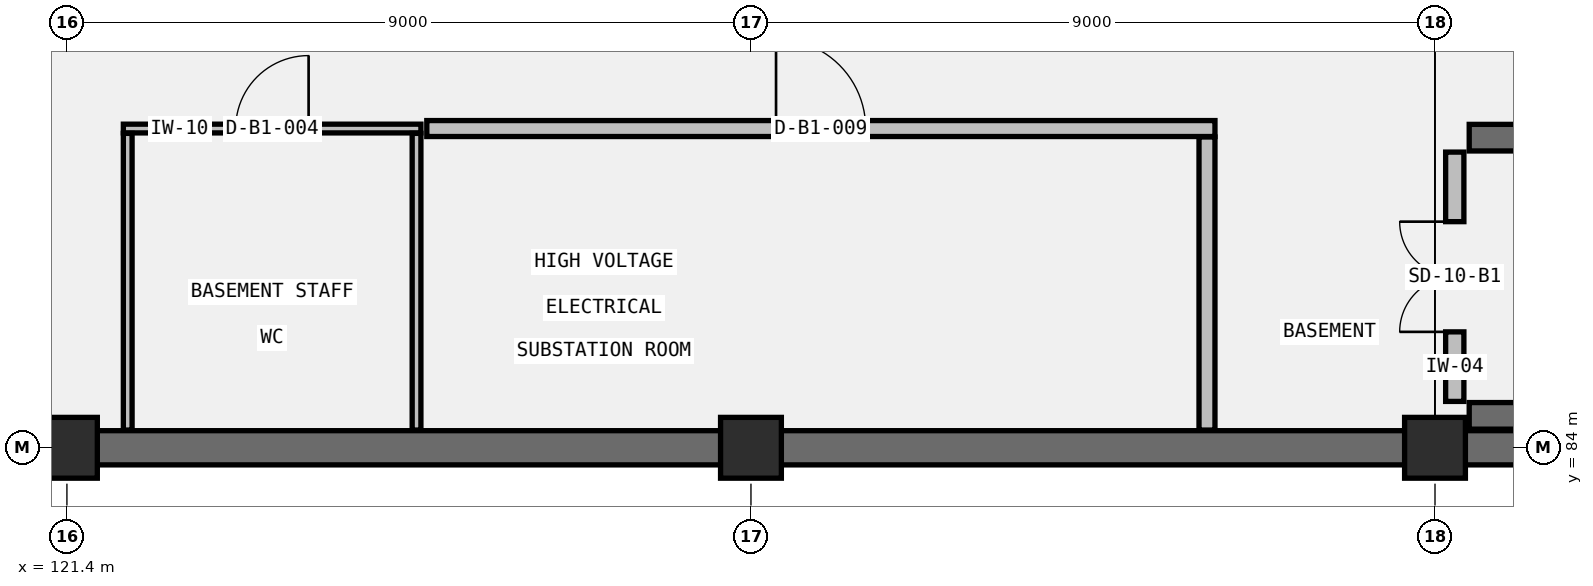
"""IFC4 building model, lengths in metres.
Left out: names, types, materials, properties, quantities, classifications, styles, units other than length and angle.
Written with IfcOpenShell. Run it as: python <this file> out.ifc"""

import sys

from ifc_helpers import new_model, si_unit, direction, frame, frame_2d, origin, origin_2d, place, context, subcontext, project, spatial, rectangle, extrude, element, fill, save


model = new_model("IFC4")
c1 = context("Model", 3, precision=1e-05, world=origin(), true_north=direction((0.0, 1.0)))
c2 = subcontext(c1, "Body", "Model", "MODEL_VIEW")
j1 = project(units=[si_unit("LENGTHUNIT", "METRE"), si_unit("PLANEANGLEUNIT", "RADIAN")], contexts=[c1])
p1 = place(None, origin())
s1 = spatial("IfcSite", under=j1, at=p1, CompositionType="ELEMENT")
p2 = place(p1, origin())
s2 = spatial("IfcBuilding", under=s1, at=p2, CompositionType="ELEMENT")
p3 = place(p2, frame((0.0, 0.0, -5.4)))
s3 = spatial("IfcBuildingStorey", under=s2, at=p3, CompositionType="ELEMENT", Elevation=-5.4)
for number, where, z_axis, x_axis in (
    (1, (121.4, 84.0, 0.0), (0.0, 0.0, 1.0), (1.0, 0.0, 0.0)),
    (2, (130.4, 84.0, 0.0), (0.0, 0.0, 1.0), (1.0, 0.0, 0.0)),
    (3, (139.4, 84.0, 0.0), (0.0, 0.0, 1.0), (1.0, 0.0, 0.0)),
):
    element("IfcColumn", number, at=place(p3, frame(where, z_axis=z_axis, x_axis=x_axis)), inside=s3, PredefinedType="COLUMN", context=c2, shape_type="SweptSolid", body=[
        extrude(rectangle(XDim=0.8, YDim=0.8, at=origin_2d()), origin(), (0.0, 0.0, 1.0), 5.4),
    ])
p4 = place(p3, frame((112.7, 84.0, 0.0), z_axis=(0.0, 0.0, 1.0), x_axis=(1.0, 0.0, 0.0)))
e4 = element("IfcWall", 4, at=p4, inside=s3, PredefinedType="SHEAR", context=c2, shape_type="SweptSolid", body=[
    extrude(rectangle(XDim=44.2, YDim=0.45, at=frame_2d((22.1, 0.0))), origin(), (0.0, 0.0, 1.0), 5.1),
])
for number, where, z_axis, x_axis in (
    (5, (139.85, 84.42, 0.0), (0.0, 0.0, 1.0), (1.0, 0.0, 0.0)),
    (6, (148.0, 88.08, 0.0), (0.0, 0.0, 1.0), (-1.0, 0.0, 0.0)),
):
    element("IfcWall", number, at=place(p3, frame(where, z_axis=z_axis, x_axis=x_axis)), inside=s3, PredefinedType="SHEAR", context=c2, shape_type="SweptSolid", body=[
        extrude(rectangle(XDim=8.15, YDim=0.35, at=frame_2d((4.075, 0.0))), origin(), (0.0, 0.0, 1.0), 5.1),
    ])
p5 = place(p3, frame((139.66, 84.61, 0.0), z_axis=(0.0, 0.0, 1.0), x_axis=(0.0, 1.0, 0.0)))
e7 = element("IfcWall", 7, at=p5, inside=s3, PredefinedType="STANDARD", context=c2, shape_type="SweptSolid", body=[
    extrude(rectangle(XDim=3.28, YDim=0.24, at=frame_2d((1.64, 0.0))), origin(), (0.0, 0.0, 1.0), 4.128),
])
p6 = place(p5, frame((0.915, 0.0, 0.0)))
e8 = element("IfcOpeningElement", 8, at=p6, cuts=e7, PredefinedType="OPENING", context=c2, shape_type="SweptSolid", body=[
    extrude(rectangle(XDim=1.45, YDim=2.2, at=frame_2d((0.725, 1.1))), frame((0.0, 0.13, 0.0), z_axis=(0.0, -1.0, 0.0), x_axis=(1.0, 0.0, 0.0)), (0.0, 0.0, 1.0), 0.26),
])
p7 = place(p3, frame((122.143, 88.2, 0.0), z_axis=(0.0, 0.0, 1.0), x_axis=(1.0, 0.0, 0.0)))
e9 = element("IfcWall", 9, at=p7, inside=s3, PredefinedType="PARTITIONING", context=c2, shape_type="SweptSolid", body=[
    extrude(rectangle(XDim=3.915, YDim=0.115, at=frame_2d((1.958, 0.0))), origin(), (0.0, 0.0, 1.0), 5.1),
])
p8 = place(p7, frame((1.478, 0.0, 0.0)))
e10 = element("IfcOpeningElement", 10, at=p8, cuts=e9, PredefinedType="OPENING", context=c2, shape_type="SweptSolid", body=[
    extrude(rectangle(XDim=0.96, YDim=2.08, at=frame_2d((0.48, 1.04))), frame((0.0, 0.067, 0.0), z_axis=(0.0, -1.0, 0.0), x_axis=(1.0, 0.0, 0.0)), (0.0, 0.0, 1.0), 0.135),
])
for number, where, z_axis, x_axis in (
    (11, (122.2, 84.233, 0.0), (0.0, 0.0, 1.0), (0.0, 1.0, 0.0)),
    (12, (126.0, 84.233, 0.0), (0.0, 0.0, 1.0), (0.0, 1.0, 0.0)),
):
    element("IfcWall", number, at=place(p3, frame(where, z_axis=z_axis, x_axis=x_axis)), inside=s3, PredefinedType="PARTITIONING", context=c2, shape_type="SweptSolid", body=[
        extrude(rectangle(XDim=3.904, YDim=0.115, at=frame_2d((1.952, 0.0))), origin(), (0.0, 0.0, 1.0), 5.1),
    ])
p9 = place(p3, frame((126.135, 88.2, 0.0), z_axis=(0.0, 0.0, 1.0), x_axis=(1.0, 0.0, 0.0)))
e13 = element("IfcWall", 13, at=p9, inside=s3, PredefinedType="PARTITIONING", context=c2, shape_type="SweptSolid", body=[
    extrude(rectangle(XDim=10.37, YDim=0.21, at=frame_2d((5.185, 0.0))), origin(), (0.0, 0.0, 1.0), 4.128),
])
p10 = place(p9, frame((4.595, 0.0, 0.0)))
e14 = element("IfcOpeningElement", 14, at=p10, cuts=e13, PredefinedType="OPENING", context=c2, shape_type="SweptSolid", body=[
    extrude(rectangle(XDim=1.18, YDim=2.22, at=frame_2d((0.59, 1.11))), frame((0.0, 0.115, 0.0), z_axis=(0.0, -1.0, 0.0), x_axis=(1.0, 0.0, 0.0)), (0.0, 0.0, 1.0), 0.23),
])
p11 = place(p3, frame((136.4, 84.233, 0.0), z_axis=(0.0, 0.0, 1.0), x_axis=(0.0, 1.0, 0.0)))
e15 = element("IfcWall", 15, at=p11, inside=s3, PredefinedType="PARTITIONING", context=c2, shape_type="SweptSolid", body=[
    extrude(rectangle(XDim=3.856, YDim=0.21, at=frame_2d((1.928, 0.0))), origin(), (0.0, 0.0, 1.0), 5.1),
])
p12 = place(p6, origin())
e16 = element("IfcDoor", 16, at=p12, inside=s3, OperationType="DOUBLE_DOOR_SINGLE_SWING", PredefinedType="DOOR", context=c2, shape_type="SweptSolid", body=[
    extrude(rectangle(XDim=1.45, YDim=2.2, at=frame_2d((0.725, 1.1))), frame((0.0, 0.025, 0.0), z_axis=(0.0, -1.0, 0.0), x_axis=(1.0, 0.0, 0.0)), (0.0, 0.0, 1.0), 0.05),
])
fill(e8, e16)
p13 = place(p8, origin())
e17 = element("IfcDoor", 17, at=p13, inside=s3, OperationType="SINGLE_SWING_RIGHT", PredefinedType="DOOR", context=c2, shape_type="SweptSolid", body=[
    extrude(rectangle(XDim=0.96, YDim=2.08, at=frame_2d((0.48, 1.04))), frame((0.0, 0.025, 0.0), z_axis=(0.0, -1.0, 0.0), x_axis=(1.0, 0.0, 0.0)), (0.0, 0.0, 1.0), 0.05),
])
fill(e10, e17)
p14 = place(p10, origin())
e18 = element("IfcDoor", 18, at=p14, inside=s3, OperationType="SINGLE_SWING_LEFT", PredefinedType="DOOR", context=c2, shape_type="SweptSolid", body=[
    extrude(rectangle(XDim=1.18, YDim=2.22, at=frame_2d((0.59, 1.11))), frame((0.0, 0.025, 0.0), z_axis=(0.0, -1.0, 0.0), x_axis=(1.0, 0.0, 0.0)), (0.0, 0.0, 1.0), 0.05),
])
fill(e14, e18)
save(model, sys.argv[1])
